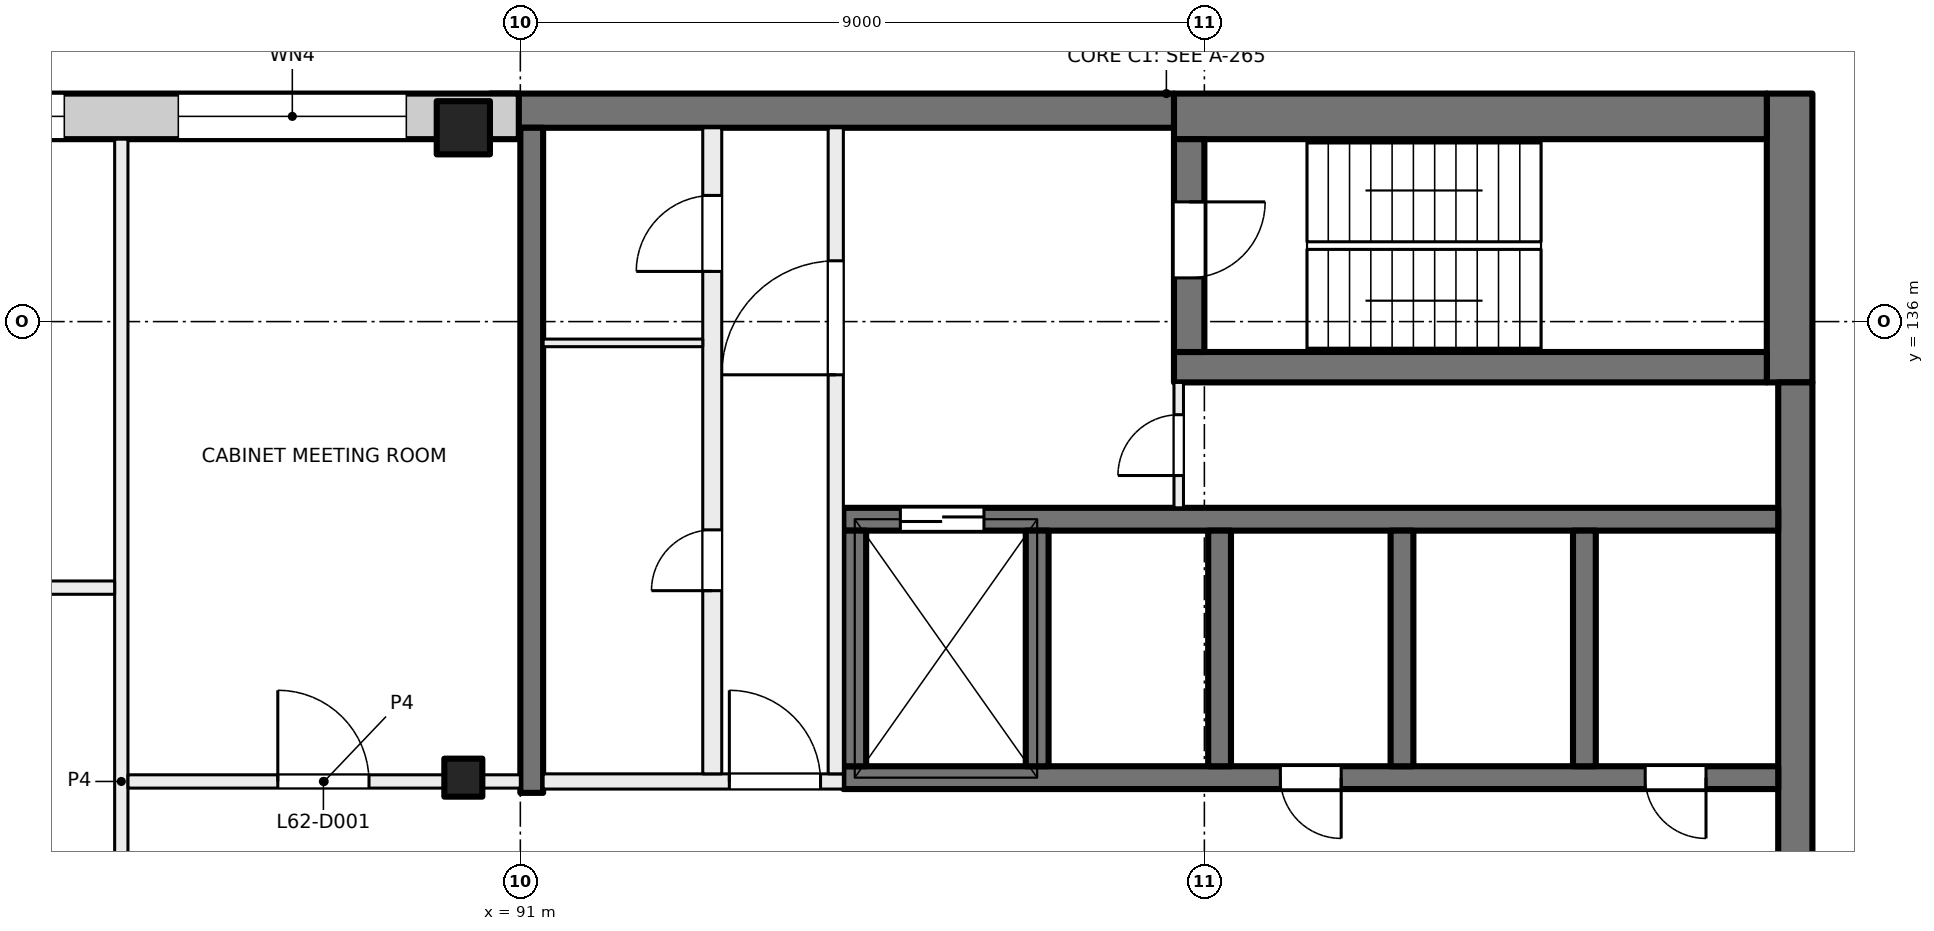
"""IFC4 building model, lengths in metres.
Left out: names, types, materials, properties, quantities, classifications, styles, units other than length and angle.
Written with IfcOpenShell. Run it as: python <this file> out.ifc"""

import sys

from ifc_helpers import new_model, si_unit, direction, frame, frame_2d, origin, origin_2d, place, context, subcontext, project, spatial, rectangle, extrude, element, fill, save


model = new_model("IFC4")
c1 = context("Model", 3, precision=1e-05, world=origin(), true_north=direction((0.0, 1.0)))
c2 = subcontext(c1, "Body", "Model", "MODEL_VIEW")
j1 = project(units=[si_unit("LENGTHUNIT", "METRE"), si_unit("PLANEANGLEUNIT", "RADIAN")], contexts=[c1])
p1 = place(None, origin())
s1 = spatial("IfcSite", under=j1, at=p1, CompositionType="ELEMENT")
p2 = place(p1, origin())
s2 = spatial("IfcBuilding", under=s1, at=p2, CompositionType="ELEMENT")
p3 = place(p2, frame((0.0, 0.0, 261.5)))
s3 = spatial("IfcBuildingStorey", under=s2, at=p3, CompositionType="ELEMENT", Elevation=261.5)
p4 = place(p3, frame((90.25, 130.0, 0.0), z_axis=(0.0, 0.0, 1.0), x_axis=(1.0, 0.0, 0.0)))
e1 = element("IfcColumn", 1, at=p4, inside=s3, PredefinedType="COLUMN", context=c2, shape_type="SweptSolid", body=[
    extrude(rectangle(XDim=0.5, YDim=0.5, at=origin_2d()), origin(), (0.0, 0.0, 1.0), 4.0),
])
p5 = place(p3, frame((90.25, 138.55, 0.0), z_axis=(0.0, 0.0, 1.0), x_axis=(1.0, 0.0, 0.0)))
e2 = element("IfcColumn", 2, at=p5, inside=s3, PredefinedType="COLUMN", context=c2, shape_type="SweptSolid", body=[
    extrude(rectangle(XDim=0.7, YDim=0.7, at=origin_2d()), origin(), (0.0, 0.0, 1.0), 4.0),
])
p6 = place(p3, frame((107.7, 139.0, 0.0), z_axis=(0.0, 0.0, 1.0), x_axis=(0.0, -1.0, 0.0)))
e3 = element("IfcWall", 3, at=p6, inside=s3, PredefinedType="SHEAR", context=c2, shape_type="SweptSolid", body=[
    extrude(rectangle(XDim=3.8, YDim=0.6, at=frame_2d((1.9, 0.0))), origin(), (0.0, 0.0, 1.0), 4.0),
])
p7 = place(p3, frame((107.775, 135.2, 0.0), z_axis=(0.0, 0.0, 1.0), x_axis=(0.0, -1.0, 0.0)))
e4 = element("IfcWall", 4, at=p7, inside=s3, PredefinedType="SHEAR", context=c2, shape_type="SweptSolid", body=[
    extrude(rectangle(XDim=14.4, YDim=0.45, at=frame_2d((7.2, 0.0))), origin(), (0.0, 0.0, 1.0), 4.0),
])
p8 = place(p3, frame((107.4, 138.7, 0.0), z_axis=(0.0, 0.0, 1.0), x_axis=(-1.0, 0.0, 0.0)))
e5 = element("IfcWall", 5, at=p8, inside=s3, PredefinedType="SHEAR", context=c2, shape_type="SweptSolid", body=[
    extrude(rectangle(XDim=7.8, YDim=0.6, at=frame_2d((3.9, 0.0))), origin(), (0.0, 0.0, 1.0), 4.0),
])
p9 = place(p3, frame((99.6, 138.775, 0.0), z_axis=(0.0, 0.0, 1.0), x_axis=(-1.0, 0.0, 0.0)))
e6 = element("IfcWall", 6, at=p9, inside=s3, PredefinedType="SHEAR", context=c2, shape_type="SweptSolid", body=[
    extrude(rectangle(XDim=9.0, YDim=0.45, at=frame_2d((4.5, 0.0))), origin(), (0.0, 0.0, 1.0), 4.0),
])
p10 = place(p3, frame((107.4, 135.4, 0.0), z_axis=(0.0, 0.0, 1.0), x_axis=(-1.0, 0.0, 0.0)))
e7 = element("IfcWall", 7, at=p10, inside=s3, PredefinedType="SHEAR", context=c2, shape_type="SweptSolid", body=[
    extrude(rectangle(XDim=7.8, YDim=0.4, at=frame_2d((3.9, 0.0))), origin(), (0.0, 0.0, 1.0), 4.0),
])
p11 = place(p3, frame((99.8, 138.4, 0.0), z_axis=(0.0, 0.0, 1.0), x_axis=(0.0, -1.0, 0.0)))
e8 = element("IfcWall", 8, at=p11, inside=s3, PredefinedType="SHEAR", context=c2, shape_type="SweptSolid", body=[
    extrude(rectangle(XDim=2.8, YDim=0.4, at=frame_2d((1.4, 0.0))), origin(), (0.0, 0.0, 1.0), 4.0),
])
p12 = place(p11, frame((0.825, 0.0, 0.0)))
e9 = element("IfcOpeningElement", 9, at=p12, cuts=e8, PredefinedType="OPENING", context=c2, shape_type="SweptSolid", body=[
    extrude(rectangle(XDim=1.0, YDim=2.1, at=frame_2d((0.5, 1.05))), frame((0.0, 0.21, 0.0), z_axis=(0.0, -1.0, 0.0), x_axis=(1.0, 0.0, 0.0)), (0.0, 0.0, 1.0), 0.42),
])
p13 = place(p3, frame((107.55, 130.0, 0.0), z_axis=(0.0, 0.0, 1.0), x_axis=(-1.0, 0.0, 0.0)))
e10 = element("IfcWall", 10, at=p13, inside=s3, PredefinedType="SHEAR", context=c2, shape_type="SweptSolid", body=[
    extrude(rectangle(XDim=12.3, YDim=0.3, at=frame_2d((6.15, 0.0))), origin(), (0.0, 0.0, 1.0), 4.0),
])
p14 = place(p13, frame((0.95, 0.0, 0.0)))
e11 = element("IfcOpeningElement", 11, at=p14, cuts=e10, PredefinedType="OPENING", context=c2, shape_type="SweptSolid", body=[
    extrude(rectangle(XDim=0.8, YDim=2.1, at=frame_2d((0.4, 1.05))), frame((0.0, 0.16, 0.0), z_axis=(0.0, -1.0, 0.0), x_axis=(1.0, 0.0, 0.0)), (0.0, 0.0, 1.0), 0.32),
])
p15 = place(p13, frame((5.75, 0.0, 0.0)))
e12 = element("IfcOpeningElement", 12, at=p15, cuts=e10, PredefinedType="OPENING", context=c2, shape_type="SweptSolid", body=[
    extrude(rectangle(XDim=0.8, YDim=2.1, at=frame_2d((0.4, 1.05))), frame((0.0, 0.16, 0.0), z_axis=(0.0, -1.0, 0.0), x_axis=(1.0, 0.0, 0.0)), (0.0, 0.0, 1.0), 0.32),
])
p16 = place(p3, frame((107.55, 133.4, 0.0), z_axis=(0.0, 0.0, 1.0), x_axis=(-1.0, 0.0, 0.0)))
e13 = element("IfcWall", 13, at=p16, inside=s3, PredefinedType="SHEAR", context=c2, shape_type="SweptSolid", body=[
    extrude(rectangle(XDim=12.3, YDim=0.3, at=frame_2d((6.15, 0.0))), origin(), (0.0, 0.0, 1.0), 4.0),
])
p17 = place(p16, frame((10.45, 0.0, 0.0)))
e14 = element("IfcOpeningElement", 14, at=p17, cuts=e13, PredefinedType="OPENING", context=c2, shape_type="SweptSolid", body=[
    extrude(rectangle(XDim=1.1, YDim=2.1, at=frame_2d((0.55, 1.05))), frame((0.0, 0.16, 0.0), z_axis=(0.0, -1.0, 0.0), x_axis=(1.0, 0.0, 0.0)), (0.0, 0.0, 1.0), 0.32),
])
for number, where, z_axis, x_axis in (
    (15, (105.0, 133.25, 0.0), (0.0, 0.0, 1.0), (0.0, -1.0, 0.0)),
    (16, (102.6, 133.25, 0.0), (0.0, 0.0, 1.0), (0.0, -1.0, 0.0)),
    (17, (100.2, 133.25, 0.0), (0.0, 0.0, 1.0), (0.0, -1.0, 0.0)),
    (18, (97.8, 133.25, 0.0), (0.0, 0.0, 1.0), (0.0, -1.0, 0.0)),
    (19, (95.4, 133.25, 0.0), (0.0, 0.0, 1.0), (0.0, -1.0, 0.0)),
):
    element("IfcWall", number, at=place(p3, frame(where, z_axis=z_axis, x_axis=x_axis)), inside=s3, PredefinedType="SHEAR", context=c2, shape_type="SweptSolid", body=[
        extrude(rectangle(XDim=3.1, YDim=0.3, at=frame_2d((1.55, 0.0))), origin(), (0.0, 0.0, 1.0), 4.0),
    ])
p18 = place(p3, frame((91.15, 138.55, 0.0), z_axis=(0.0, 0.0, 1.0), x_axis=(0.0, -1.0, 0.0)))
e20 = element("IfcWall", 20, at=p18, inside=s3, PredefinedType="SHEAR", context=c2, shape_type="SweptSolid", body=[
    extrude(rectangle(XDim=8.75, YDim=0.3, at=frame_2d((4.375, 0.0))), origin(), (0.0, 0.0, 1.0), 4.0),
])
p19 = place(p3, frame((47.07, 138.7, 0.0), z_axis=(0.0, 0.0, 1.0), x_axis=(1.0, 0.0, 0.0)))
e21 = element("IfcWall", 21, at=p19, inside=s3, PredefinedType="SOLIDWALL", context=c2, shape_type="SweptSolid", body=[
    extrude(rectangle(XDim=43.91, YDim=0.6, at=frame_2d((21.955, 0.0))), origin(), (0.0, 0.0, 1.0), 3.625),
])
p20 = place(p19, frame((3.43, 0.0, 0.9)))
e22 = element("IfcOpeningElement", 22, at=p20, cuts=e21, PredefinedType="OPENING", context=c2, shape_type="SweptSolid", body=[
    extrude(rectangle(XDim=3.0, YDim=2.4, at=frame_2d((1.5, 1.2))), frame((0.0, 0.31, 0.0), z_axis=(0.0, -1.0, 0.0), x_axis=(1.0, 0.0, 0.0)), (0.0, 0.0, 1.0), 0.62),
])
p21 = place(p19, frame((7.93, 0.0, 0.9)))
e23 = element("IfcOpeningElement", 23, at=p21, cuts=e21, PredefinedType="OPENING", context=c2, shape_type="SweptSolid", body=[
    extrude(rectangle(XDim=3.0, YDim=2.4, at=frame_2d((1.5, 1.2))), frame((0.0, 0.31, 0.0), z_axis=(0.0, -1.0, 0.0), x_axis=(1.0, 0.0, 0.0)), (0.0, 0.0, 1.0), 0.62),
])
p22 = place(p19, frame((12.43, 0.0, 0.9)))
e24 = element("IfcOpeningElement", 24, at=p22, cuts=e21, PredefinedType="OPENING", context=c2, shape_type="SweptSolid", body=[
    extrude(rectangle(XDim=3.0, YDim=2.4, at=frame_2d((1.5, 1.2))), frame((0.0, 0.31, 0.0), z_axis=(0.0, -1.0, 0.0), x_axis=(1.0, 0.0, 0.0)), (0.0, 0.0, 1.0), 0.62),
])
p23 = place(p19, frame((16.93, 0.0, 0.9)))
e25 = element("IfcOpeningElement", 25, at=p23, cuts=e21, PredefinedType="OPENING", context=c2, shape_type="SweptSolid", body=[
    extrude(rectangle(XDim=3.0, YDim=2.4, at=frame_2d((1.5, 1.2))), frame((0.0, 0.31, 0.0), z_axis=(0.0, -1.0, 0.0), x_axis=(1.0, 0.0, 0.0)), (0.0, 0.0, 1.0), 0.62),
])
p24 = place(p19, frame((21.43, 0.0, 0.9)))
e26 = element("IfcOpeningElement", 26, at=p24, cuts=e21, PredefinedType="OPENING", context=c2, shape_type="SweptSolid", body=[
    extrude(rectangle(XDim=3.0, YDim=2.4, at=frame_2d((1.5, 1.2))), frame((0.0, 0.31, 0.0), z_axis=(0.0, -1.0, 0.0), x_axis=(1.0, 0.0, 0.0)), (0.0, 0.0, 1.0), 0.62),
])
p25 = place(p19, frame((25.93, 0.0, 0.9)))
e27 = element("IfcOpeningElement", 27, at=p25, cuts=e21, PredefinedType="OPENING", context=c2, shape_type="SweptSolid", body=[
    extrude(rectangle(XDim=3.0, YDim=2.4, at=frame_2d((1.5, 1.2))), frame((0.0, 0.31, 0.0), z_axis=(0.0, -1.0, 0.0), x_axis=(1.0, 0.0, 0.0)), (0.0, 0.0, 1.0), 0.62),
])
p26 = place(p19, frame((30.43, 0.0, 0.9)))
e28 = element("IfcOpeningElement", 28, at=p26, cuts=e21, PredefinedType="OPENING", context=c2, shape_type="SweptSolid", body=[
    extrude(rectangle(XDim=3.0, YDim=2.4, at=frame_2d((1.5, 1.2))), frame((0.0, 0.31, 0.0), z_axis=(0.0, -1.0, 0.0), x_axis=(1.0, 0.0, 0.0)), (0.0, 0.0, 1.0), 0.62),
])
p27 = place(p19, frame((34.93, 0.0, 0.9)))
e29 = element("IfcOpeningElement", 29, at=p27, cuts=e21, PredefinedType="OPENING", context=c2, shape_type="SweptSolid", body=[
    extrude(rectangle(XDim=3.0, YDim=2.4, at=frame_2d((1.5, 1.2))), frame((0.0, 0.31, 0.0), z_axis=(0.0, -1.0, 0.0), x_axis=(1.0, 0.0, 0.0)), (0.0, 0.0, 1.0), 0.62),
])
p28 = place(p19, frame((39.43, 0.0, 0.9)))
e30 = element("IfcOpeningElement", 30, at=p28, cuts=e21, PredefinedType="OPENING", context=c2, shape_type="SweptSolid", body=[
    extrude(rectangle(XDim=3.0, YDim=2.4, at=frame_2d((1.5, 1.2))), frame((0.0, 0.31, 0.0), z_axis=(0.0, -1.0, 0.0), x_axis=(1.0, 0.0, 0.0)), (0.0, 0.0, 1.0), 0.62),
])
p29 = place(p3, frame((91.3, 129.95, 0.0), z_axis=(0.0, 0.0, 1.0), x_axis=(1.0, 0.0, 0.0)))
e31 = element("IfcWall", 31, at=p29, inside=s3, PredefinedType="PARTITIONING", context=c2, shape_type="SweptSolid", body=[
    extrude(rectangle(XDim=3.95, YDim=0.2, at=frame_2d((1.975, 0.0))), origin(), (0.0, 0.0, 1.0), 3.625),
])
p30 = place(p29, frame((2.45, 0.0, 0.0)))
e32 = element("IfcOpeningElement", 32, at=p30, cuts=e31, PredefinedType="OPENING", context=c2, shape_type="SweptSolid", body=[
    extrude(rectangle(XDim=1.2, YDim=2.1, at=frame_2d((0.6, 1.05))), frame((0.0, 0.11, 0.0), z_axis=(0.0, -1.0, 0.0), x_axis=(1.0, 0.0, 0.0)), (0.0, 0.0, 1.0), 0.22),
])
p31 = place(p3, frame((95.15, 130.05, 0.0), z_axis=(0.0, 0.0, 1.0), x_axis=(0.0, 1.0, 0.0)))
e33 = element("IfcWall", 33, at=p31, inside=s3, PredefinedType="PARTITIONING", context=c2, shape_type="SweptSolid", body=[
    extrude(rectangle(XDim=8.5, YDim=0.2, at=frame_2d((4.25, 0.0))), origin(), (0.0, 0.0, 1.0), 3.625),
])
p32 = place(p31, frame((5.25, 0.0, 0.0)))
e34 = element("IfcOpeningElement", 34, at=p32, cuts=e33, PredefinedType="OPENING", context=c2, shape_type="SweptSolid", body=[
    extrude(rectangle(XDim=1.5, YDim=2.1, at=frame_2d((0.75, 1.05))), frame((0.0, 0.11, 0.0), z_axis=(0.0, -1.0, 0.0), x_axis=(1.0, 0.0, 0.0)), (0.0, 0.0, 1.0), 0.22),
])
p33 = place(p3, frame((93.525, 130.05, 0.0), z_axis=(0.0, 0.0, 1.0), x_axis=(0.0, 1.0, 0.0)))
e35 = element("IfcWall", 35, at=p33, inside=s3, PredefinedType="PARTITIONING", context=c2, shape_type="SweptSolid", body=[
    extrude(rectangle(XDim=8.5, YDim=0.25, at=frame_2d((4.25, 0.0))), origin(), (0.0, 0.0, 1.0), 3.625),
])
p34 = place(p33, frame((2.41, 0.0, 0.0)))
e36 = element("IfcOpeningElement", 36, at=p34, cuts=e35, PredefinedType="OPENING", context=c2, shape_type="SweptSolid", body=[
    extrude(rectangle(XDim=0.8, YDim=2.1, at=frame_2d((0.4, 1.05))), frame((0.0, 0.135, 0.0), z_axis=(0.0, -1.0, 0.0), x_axis=(1.0, 0.0, 0.0)), (0.0, 0.0, 1.0), 0.27),
])
p35 = place(p33, frame((6.61, 0.0, 0.0)))
e37 = element("IfcOpeningElement", 37, at=p35, cuts=e35, PredefinedType="OPENING", context=c2, shape_type="SweptSolid", body=[
    extrude(rectangle(XDim=1.0, YDim=2.1, at=frame_2d((0.5, 1.05))), frame((0.0, 0.135, 0.0), z_axis=(0.0, -1.0, 0.0), x_axis=(1.0, 0.0, 0.0)), (0.0, 0.0, 1.0), 0.27),
])
p36 = place(p3, frame((99.663, 133.55, 0.0), z_axis=(0.0, 0.0, 1.0), x_axis=(0.0, 1.0, 0.0)))
e38 = element("IfcWall", 38, at=p36, inside=s3, PredefinedType="PARTITIONING", context=c2, shape_type="SweptSolid", body=[
    extrude(rectangle(XDim=1.65, YDim=0.125, at=frame_2d((0.825, 0.0))), origin(), (0.0, 0.0, 1.0), 3.625),
])
p37 = place(p36, frame((0.425, 0.0, 0.0)))
e39 = element("IfcOpeningElement", 39, at=p37, cuts=e38, PredefinedType="OPENING", context=c2, shape_type="SweptSolid", body=[
    extrude(rectangle(XDim=0.8, YDim=2.1, at=frame_2d((0.4, 1.05))), frame((0.0, 0.073, 0.0), z_axis=(0.0, -1.0, 0.0), x_axis=(1.0, 0.0, 0.0)), (0.0, 0.0, 1.0), 0.145),
])
p38 = place(p3, frame((91.3, 135.72, 0.0), z_axis=(0.0, 0.0, 1.0), x_axis=(1.0, 0.0, 0.0)))
e40 = element("IfcWall", 40, at=p38, inside=s3, PredefinedType="PARTITIONING", context=c2, shape_type="SweptSolid", body=[
    extrude(rectangle(XDim=2.1, YDim=0.1, at=frame_2d((1.05, 0.0))), origin(), (0.0, 0.0, 1.0), 3.625),
])
p39 = place(p3, frame((85.75, 121.5, 0.0), z_axis=(0.0, 0.0, 1.0), x_axis=(0.0, 1.0, 0.0)))
e41 = element("IfcWall", 41, at=p39, inside=s3, PredefinedType="PARTITIONING", context=c2, shape_type="SweptSolid", body=[
    extrude(rectangle(XDim=16.9, YDim=0.175, at=frame_2d((8.45, 0.0))), origin(), (0.0, 0.0, 1.0), 3.625),
])
p40 = place(p3, frame((85.662, 132.5, 0.0), z_axis=(0.0, 0.0, 1.0), x_axis=(-1.0, 0.0, 0.0)))
e42 = element("IfcWall", 42, at=p40, inside=s3, PredefinedType="PARTITIONING", context=c2, shape_type="SweptSolid", body=[
    extrude(rectangle(XDim=4.324, YDim=0.175, at=frame_2d((2.162, 0.0))), origin(), (0.0, 0.0, 1.0), 3.625),
])
p41 = place(p3, frame((85.838, 129.95, 0.0), z_axis=(0.0, 0.0, 1.0), x_axis=(1.0, 0.0, 0.0)))
e43 = element("IfcWall", 43, at=p41, inside=s3, PredefinedType="PARTITIONING", context=c2, shape_type="SweptSolid", body=[
    extrude(rectangle(XDim=5.162, YDim=0.175, at=frame_2d((2.581, 0.0))), origin(), (0.0, 0.0, 1.0), 3.625),
])
p42 = place(p41, frame((1.971, 0.0, 0.0)))
e44 = element("IfcOpeningElement", 44, at=p42, cuts=e43, PredefinedType="OPENING", context=c2, shape_type="SweptSolid", body=[
    extrude(rectangle(XDim=1.2, YDim=2.1, at=frame_2d((0.6, 1.05))), frame((0.0, 0.097, 0.0), z_axis=(0.0, -1.0, 0.0), x_axis=(1.0, 0.0, 0.0)), (0.0, 0.0, 1.0), 0.195),
])
p43 = place(p27, origin())
e45 = element("IfcWindow", 45, at=p43, inside=s3, PartitioningType="SINGLE_PANEL", PredefinedType="WINDOW", context=c2, shape_type="SweptSolid", body=[
    extrude(rectangle(XDim=3.0, YDim=2.4, at=frame_2d((1.5, 1.2))), frame((0.0, 0.03, 0.0), z_axis=(0.0, -1.0, 0.0), x_axis=(1.0, 0.0, 0.0)), (0.0, 0.0, 1.0), 0.06),
])
fill(e29, e45)
p44 = place(p28, origin())
e46 = element("IfcWindow", 46, at=p44, inside=s3, PartitioningType="SINGLE_PANEL", PredefinedType="WINDOW", context=c2, shape_type="SweptSolid", body=[
    extrude(rectangle(XDim=3.0, YDim=2.4, at=frame_2d((1.5, 1.2))), frame((0.0, 0.03, 0.0), z_axis=(0.0, -1.0, 0.0), x_axis=(1.0, 0.0, 0.0)), (0.0, 0.0, 1.0), 0.06),
])
fill(e30, e46)
p45 = place(p14, origin())
e47 = element("IfcDoor", 47, at=p45, inside=s3, OperationType="SINGLE_SWING_LEFT", PredefinedType="DOOR", context=c2, shape_type="SweptSolid", body=[
    extrude(rectangle(XDim=0.8, YDim=2.1, at=frame_2d((0.4, 1.05))), frame((0.0, 0.025, 0.0), z_axis=(0.0, -1.0, 0.0), x_axis=(1.0, 0.0, 0.0)), (0.0, 0.0, 1.0), 0.05),
])
fill(e11, e47)
p46 = place(p15, origin())
e48 = element("IfcDoor", 48, at=p46, inside=s3, OperationType="SINGLE_SWING_RIGHT", PredefinedType="DOOR", context=c2, shape_type="SweptSolid", body=[
    extrude(rectangle(XDim=0.8, YDim=2.1, at=frame_2d((0.4, 1.05))), frame((0.0, 0.025, 0.0), z_axis=(0.0, -1.0, 0.0), x_axis=(1.0, 0.0, 0.0)), (0.0, 0.0, 1.0), 0.05),
])
fill(e12, e48)
p47 = place(p30, origin())
e49 = element("IfcDoor", 49, at=p47, inside=s3, OperationType="DOUBLE_DOOR_SINGLE_SWING", PredefinedType="DOOR", context=c2, shape_type="SweptSolid", body=[
    extrude(rectangle(XDim=1.2, YDim=2.1, at=frame_2d((0.6, 1.05))), frame((0.0, 0.025, 0.0), z_axis=(0.0, -1.0, 0.0), x_axis=(1.0, 0.0, 0.0)), (0.0, 0.0, 1.0), 0.05),
])
fill(e32, e49)
p48 = place(p32, origin())
e50 = element("IfcDoor", 50, at=p48, inside=s3, OperationType="DOUBLE_DOOR_SINGLE_SWING", PredefinedType="DOOR", context=c2, shape_type="SweptSolid", body=[
    extrude(rectangle(XDim=1.5, YDim=2.1, at=frame_2d((0.75, 1.05))), frame((0.0, 0.025, 0.0), z_axis=(0.0, -1.0, 0.0), x_axis=(1.0, 0.0, 0.0)), (0.0, 0.0, 1.0), 0.05),
])
fill(e34, e50)
p49 = place(p12, origin())
e51 = element("IfcDoor", 51, at=p49, inside=s3, OperationType="SINGLE_SWING_RIGHT", PredefinedType="DOOR", context=c2, shape_type="SweptSolid", body=[
    extrude(rectangle(XDim=1.0, YDim=2.1, at=frame_2d((0.5, 1.05))), frame((0.0, 0.025, 0.0), z_axis=(0.0, -1.0, 0.0), x_axis=(1.0, 0.0, 0.0)), (0.0, 0.0, 1.0), 0.05),
])
fill(e9, e51)
p50 = place(p37, origin())
e52 = element("IfcDoor", 52, at=p50, inside=s3, OperationType="SINGLE_SWING_LEFT", PredefinedType="DOOR", context=c2, shape_type="SweptSolid", body=[
    extrude(rectangle(XDim=0.8, YDim=2.1, at=frame_2d((0.4, 1.05))), frame((0.0, 0.025, 0.0), z_axis=(0.0, -1.0, 0.0), x_axis=(1.0, 0.0, 0.0)), (0.0, 0.0, 1.0), 0.05),
])
fill(e39, e52)
p51 = place(p34, origin())
e53 = element("IfcDoor", 53, at=p51, inside=s3, OperationType="SINGLE_SWING_RIGHT", PredefinedType="DOOR", context=c2, shape_type="SweptSolid", body=[
    extrude(rectangle(XDim=0.8, YDim=2.1, at=frame_2d((0.4, 1.05))), frame((0.0, 0.025, 0.0), z_axis=(0.0, -1.0, 0.0), x_axis=(1.0, 0.0, 0.0)), (0.0, 0.0, 1.0), 0.05),
])
fill(e36, e53)
p52 = place(p35, origin())
e54 = element("IfcDoor", 54, at=p52, inside=s3, OperationType="SINGLE_SWING_LEFT", PredefinedType="DOOR", context=c2, shape_type="SweptSolid", body=[
    extrude(rectangle(XDim=1.0, YDim=2.1, at=frame_2d((0.5, 1.05))), frame((0.0, 0.025, 0.0), z_axis=(0.0, -1.0, 0.0), x_axis=(1.0, 0.0, 0.0)), (0.0, 0.0, 1.0), 0.05),
])
fill(e37, e54)
p53 = place(p17, origin())
e55 = element("IfcDoor", 55, at=p53, inside=s3, OperationType="DOUBLE_DOOR_SLIDING", PredefinedType="DOOR", context=c2, shape_type="SweptSolid", body=[
    extrude(rectangle(XDim=1.1, YDim=2.1, at=frame_2d((0.55, 1.05))), frame((0.0, 0.025, 0.0), z_axis=(0.0, -1.0, 0.0), x_axis=(1.0, 0.0, 0.0)), (0.0, 0.0, 1.0), 0.05),
])
fill(e14, e55)
p54 = place(p42, origin())
e56 = element("IfcDoor", 56, at=p54, inside=s3, OperationType="DOUBLE_DOOR_SINGLE_SWING", PredefinedType="DOOR", context=c2, shape_type="SweptSolid", body=[
    extrude(rectangle(XDim=1.2, YDim=2.1, at=frame_2d((0.6, 1.05))), frame((0.0, 0.025, 0.0), z_axis=(0.0, -1.0, 0.0), x_axis=(1.0, 0.0, 0.0)), (0.0, 0.0, 1.0), 0.05),
])
fill(e44, e56)
save(model, sys.argv[1])
